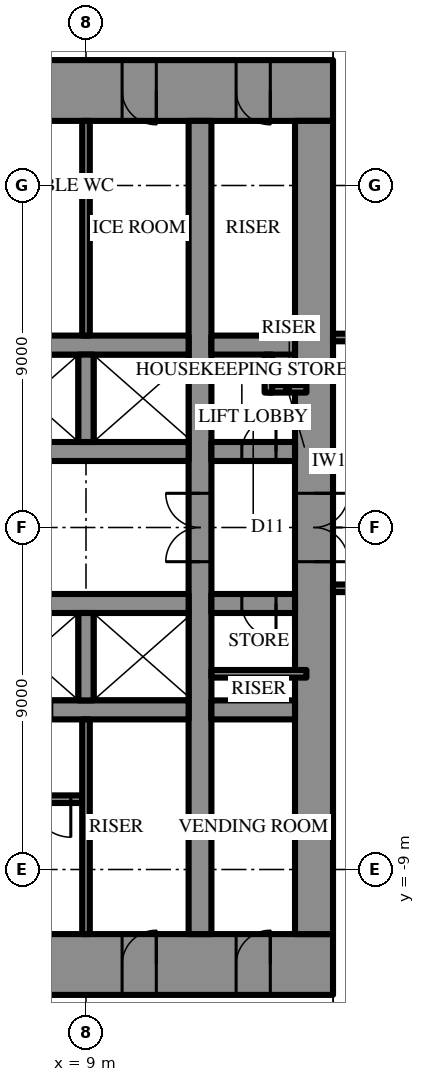
"""IFC4 building model, lengths in metres.
Left out: names, types, materials, properties, quantities, classifications, styles, units other than length and angle.
Written with IfcOpenShell. Run it as: python <this file> out.ifc"""

import sys

from ifc_helpers import new_model, si_unit, direction, frame, frame_2d, origin, place, context, subcontext, project, spatial, rectangle, extrude, element, fill, save


model = new_model("IFC4")
c1 = context("Model", 3, precision=1e-05, world=origin(), true_north=direction((0.0, 1.0)))
c2 = subcontext(c1, "Body", "Model", "MODEL_VIEW")
j1 = project(units=[si_unit("LENGTHUNIT", "METRE"), si_unit("PLANEANGLEUNIT", "RADIAN")], contexts=[c1])
p1 = place(None, origin())
s1 = spatial("IfcSite", under=j1, at=p1, CompositionType="ELEMENT")
p2 = place(p1, origin())
s2 = spatial("IfcBuilding", under=s1, at=p2, CompositionType="ELEMENT")
p3 = place(p2, frame((0.0, 0.0, 274.3)))
s3 = spatial("IfcBuildingStorey", under=s2, at=p3, CompositionType="ELEMENT", Elevation=274.3)
p4 = place(p3, frame((-15.5, 11.5, 0.0), z_axis=(0.0, 0.0, 1.0), x_axis=(1.0, 0.0, 0.0)))
e1 = element("IfcWall", 1, at=p4, inside=s3, PredefinedType="SHEAR", context=c2, shape_type="SweptSolid", body=[
    extrude(rectangle(XDim=31.0, YDim=1.6, at=frame_2d((15.5, 0.0))), origin(), (0.0, 0.0, 1.0), 4.2),
])
p5 = place(p4, frame((16.35, 0.0, 0.0)))
e2 = element("IfcOpeningElement", 2, at=p5, cuts=e1, PredefinedType="OPENING", context=c2, shape_type="SweptSolid", body=[
    extrude(rectangle(XDim=0.9, YDim=2.2, at=frame_2d((0.45, 1.1))), frame((0.0, 0.81, 0.0), z_axis=(0.0, -1.0, 0.0), x_axis=(1.0, 0.0, 0.0)), (0.0, 0.0, 1.0), 1.62),
])
p6 = place(p4, frame((19.35, 0.0, 0.0)))
e3 = element("IfcOpeningElement", 3, at=p6, cuts=e1, PredefinedType="OPENING", context=c2, shape_type="SweptSolid", body=[
    extrude(rectangle(XDim=0.9, YDim=2.2, at=frame_2d((0.45, 1.1))), frame((0.0, 0.81, 0.0), z_axis=(0.0, -1.0, 0.0), x_axis=(1.0, 0.0, 0.0)), (0.0, 0.0, 1.0), 1.62),
])
p7 = place(p4, frame((22.4, 0.0, 0.0)))
e4 = element("IfcOpeningElement", 4, at=p7, cuts=e1, PredefinedType="OPENING", context=c2, shape_type="SweptSolid", body=[
    extrude(rectangle(XDim=1.0, YDim=2.2, at=frame_2d((0.5, 1.1))), frame((0.0, 0.81, 0.0), z_axis=(0.0, -1.0, 0.0), x_axis=(1.0, 0.0, 0.0)), (0.0, 0.0, 1.0), 1.62),
])
p8 = place(p4, frame((1.65, 0.0, 0.0)))
e5 = element("IfcOpeningElement", 5, at=p8, cuts=e1, PredefinedType="OPENING", context=c2, shape_type="SweptSolid", body=[
    extrude(rectangle(XDim=0.9, YDim=2.2, at=frame_2d((0.45, 1.1))), frame((0.0, 0.81, 0.0), z_axis=(0.0, -1.0, 0.0), x_axis=(1.0, 0.0, 0.0)), (0.0, 0.0, 1.0), 1.62),
])
p9 = place(p4, frame((4.65, 0.0, 0.0)))
e6 = element("IfcOpeningElement", 6, at=p9, cuts=e1, PredefinedType="OPENING", context=c2, shape_type="SweptSolid", body=[
    extrude(rectangle(XDim=0.9, YDim=2.2, at=frame_2d((0.45, 1.1))), frame((0.0, 0.81, 0.0), z_axis=(0.0, -1.0, 0.0), x_axis=(1.0, 0.0, 0.0)), (0.0, 0.0, 1.0), 1.62),
])
p10 = place(p4, frame((25.45, 0.0, 0.0)))
e7 = element("IfcOpeningElement", 7, at=p10, cuts=e1, PredefinedType="OPENING", context=c2, shape_type="SweptSolid", body=[
    extrude(rectangle(XDim=0.9, YDim=2.2, at=frame_2d((0.45, 1.1))), frame((0.0, 0.81, 0.0), z_axis=(0.0, -1.0, 0.0), x_axis=(1.0, 0.0, 0.0)), (0.0, 0.0, 1.0), 1.62),
])
p11 = place(p4, frame((28.45, 0.0, 0.0)))
e8 = element("IfcOpeningElement", 8, at=p11, cuts=e1, PredefinedType="OPENING", context=c2, shape_type="SweptSolid", body=[
    extrude(rectangle(XDim=0.9, YDim=2.2, at=frame_2d((0.45, 1.1))), frame((0.0, 0.81, 0.0), z_axis=(0.0, -1.0, 0.0), x_axis=(1.0, 0.0, 0.0)), (0.0, 0.0, 1.0), 1.62),
])
p12 = place(p3, frame((15.5, -11.5, 0.0), z_axis=(0.0, 0.0, 1.0), x_axis=(-1.0, 0.0, 0.0)))
e9 = element("IfcWall", 9, at=p12, inside=s3, PredefinedType="SHEAR", context=c2, shape_type="SweptSolid", body=[
    extrude(rectangle(XDim=31.0, YDim=1.6, at=frame_2d((15.5, 0.0))), origin(), (0.0, 0.0, 1.0), 4.2),
])
p13 = place(p12, frame((16.35, 0.0, 0.0)))
e10 = element("IfcOpeningElement", 10, at=p13, cuts=e9, PredefinedType="OPENING", context=c2, shape_type="SweptSolid", body=[
    extrude(rectangle(XDim=0.9, YDim=2.2, at=frame_2d((0.45, 1.1))), frame((0.0, 0.81, 0.0), z_axis=(0.0, -1.0, 0.0), x_axis=(1.0, 0.0, 0.0)), (0.0, 0.0, 1.0), 1.62),
])
p14 = place(p12, frame((19.35, 0.0, 0.0)))
e11 = element("IfcOpeningElement", 11, at=p14, cuts=e9, PredefinedType="OPENING", context=c2, shape_type="SweptSolid", body=[
    extrude(rectangle(XDim=0.9, YDim=2.2, at=frame_2d((0.45, 1.1))), frame((0.0, 0.81, 0.0), z_axis=(0.0, -1.0, 0.0), x_axis=(1.0, 0.0, 0.0)), (0.0, 0.0, 1.0), 1.62),
])
p15 = place(p12, frame((22.4, 0.0, 0.0)))
e12 = element("IfcOpeningElement", 12, at=p15, cuts=e9, PredefinedType="OPENING", context=c2, shape_type="SweptSolid", body=[
    extrude(rectangle(XDim=1.0, YDim=2.2, at=frame_2d((0.5, 1.1))), frame((0.0, 0.81, 0.0), z_axis=(0.0, -1.0, 0.0), x_axis=(1.0, 0.0, 0.0)), (0.0, 0.0, 1.0), 1.62),
])
p16 = place(p12, frame((1.65, 0.0, 0.0)))
e13 = element("IfcOpeningElement", 13, at=p16, cuts=e9, PredefinedType="OPENING", context=c2, shape_type="SweptSolid", body=[
    extrude(rectangle(XDim=0.9, YDim=2.2, at=frame_2d((0.45, 1.1))), frame((0.0, 0.81, 0.0), z_axis=(0.0, -1.0, 0.0), x_axis=(1.0, 0.0, 0.0)), (0.0, 0.0, 1.0), 1.62),
])
p17 = place(p12, frame((4.65, 0.0, 0.0)))
e14 = element("IfcOpeningElement", 14, at=p17, cuts=e9, PredefinedType="OPENING", context=c2, shape_type="SweptSolid", body=[
    extrude(rectangle(XDim=0.9, YDim=2.2, at=frame_2d((0.45, 1.1))), frame((0.0, 0.81, 0.0), z_axis=(0.0, -1.0, 0.0), x_axis=(1.0, 0.0, 0.0)), (0.0, 0.0, 1.0), 1.62),
])
p18 = place(p12, frame((25.45, 0.0, 0.0)))
e15 = element("IfcOpeningElement", 15, at=p18, cuts=e9, PredefinedType="OPENING", context=c2, shape_type="SweptSolid", body=[
    extrude(rectangle(XDim=0.9, YDim=2.2, at=frame_2d((0.45, 1.1))), frame((0.0, 0.81, 0.0), z_axis=(0.0, -1.0, 0.0), x_axis=(1.0, 0.0, 0.0)), (0.0, 0.0, 1.0), 1.62),
])
p19 = place(p12, frame((28.45, 0.0, 0.0)))
e16 = element("IfcOpeningElement", 16, at=p19, cuts=e9, PredefinedType="OPENING", context=c2, shape_type="SweptSolid", body=[
    extrude(rectangle(XDim=0.9, YDim=2.2, at=frame_2d((0.45, 1.1))), frame((0.0, 0.81, 0.0), z_axis=(0.0, -1.0, 0.0), x_axis=(1.0, 0.0, 0.0)), (0.0, 0.0, 1.0), 1.62),
])
p20 = place(p3, frame((15.0, -10.7, 0.0), z_axis=(0.0, 0.0, 1.0), x_axis=(0.0, 1.0, 0.0)))
e17 = element("IfcWall", 17, at=p20, inside=s3, PredefinedType="SHEAR", context=c2, shape_type="SweptSolid", body=[
    extrude(rectangle(XDim=21.4, YDim=1.0, at=frame_2d((10.7, 0.0))), origin(), (0.0, 0.0, 1.0), 4.2),
])
p21 = place(p20, frame((9.8, 0.0, 0.0)))
e18 = element("IfcOpeningElement", 18, at=p21, cuts=e17, PredefinedType="OPENING", context=c2, shape_type="SweptSolid", body=[
    extrude(rectangle(XDim=1.8, YDim=2.4, at=frame_2d((0.9, 1.2))), frame((0.0, 0.51, 0.0), z_axis=(0.0, -1.0, 0.0), x_axis=(1.0, 0.0, 0.0)), (0.0, 0.0, 1.0), 1.02),
])
p22 = place(p3, frame((12.0, -10.7, 0.0), z_axis=(0.0, 0.0, 1.0), x_axis=(0.0, 1.0, 0.0)))
e19 = element("IfcWall", 19, at=p22, inside=s3, PredefinedType="SHEAR", context=c2, shape_type="SweptSolid", body=[
    extrude(rectangle(XDim=21.4, YDim=0.6, at=frame_2d((10.7, 0.0))), origin(), (0.0, 0.0, 1.0), 4.2),
])
p23 = place(p22, frame((9.8, 0.0, 0.0)))
e20 = element("IfcOpeningElement", 20, at=p23, cuts=e19, PredefinedType="OPENING", context=c2, shape_type="SweptSolid", body=[
    extrude(rectangle(XDim=1.8, YDim=2.4, at=frame_2d((0.9, 1.2))), frame((0.0, 0.31, 0.0), z_axis=(0.0, -1.0, 0.0), x_axis=(1.0, 0.0, 0.0)), (0.0, 0.0, 1.0), 0.62),
])
p24 = place(p3, frame((-3.2, 2.0, 0.0), z_axis=(0.0, 0.0, 1.0), x_axis=(1.0, 0.0, 0.0)))
e21 = element("IfcWall", 21, at=p24, inside=s3, PredefinedType="SHEAR", context=c2, shape_type="SweptSolid", body=[
    extrude(rectangle(XDim=14.9, YDim=0.5, at=frame_2d((7.45, 0.0))), origin(), (0.0, 0.0, 1.0), 4.2),
])
p25 = place(p24, frame((1.15, 0.0, 0.0)))
e22 = element("IfcOpeningElement", 22, at=p25, cuts=e21, PredefinedType="OPENING", context=c2, shape_type="SweptSolid", body=[
    extrude(rectangle(XDim=1.1, YDim=2.2, at=frame_2d((0.55, 1.1))), frame((0.0, 0.26, 0.0), z_axis=(0.0, -1.0, 0.0), x_axis=(1.0, 0.0, 0.0)), (0.0, 0.0, 1.0), 0.52),
])
p26 = place(p24, frame((4.15, 0.0, 0.0)))
e23 = element("IfcOpeningElement", 23, at=p26, cuts=e21, PredefinedType="OPENING", context=c2, shape_type="SweptSolid", body=[
    extrude(rectangle(XDim=1.1, YDim=2.2, at=frame_2d((0.55, 1.1))), frame((0.0, 0.26, 0.0), z_axis=(0.0, -1.0, 0.0), x_axis=(1.0, 0.0, 0.0)), (0.0, 0.0, 1.0), 0.52),
])
p27 = place(p24, frame((7.15, 0.0, 0.0)))
e24 = element("IfcOpeningElement", 24, at=p27, cuts=e21, PredefinedType="OPENING", context=c2, shape_type="SweptSolid", body=[
    extrude(rectangle(XDim=1.1, YDim=2.2, at=frame_2d((0.55, 1.1))), frame((0.0, 0.26, 0.0), z_axis=(0.0, -1.0, 0.0), x_axis=(1.0, 0.0, 0.0)), (0.0, 0.0, 1.0), 0.52),
])
p28 = place(p24, frame((10.15, 0.0, 0.0)))
e25 = element("IfcOpeningElement", 25, at=p28, cuts=e21, PredefinedType="OPENING", context=c2, shape_type="SweptSolid", body=[
    extrude(rectangle(XDim=1.1, YDim=2.2, at=frame_2d((0.55, 1.1))), frame((0.0, 0.26, 0.0), z_axis=(0.0, -1.0, 0.0), x_axis=(1.0, 0.0, 0.0)), (0.0, 0.0, 1.0), 0.52),
])
p29 = place(p3, frame((12.3, 2.0, 0.0), z_axis=(0.0, 0.0, 1.0), x_axis=(1.0, 0.0, 0.0)))
e26 = element("IfcWall", 26, at=p29, inside=s3, PredefinedType="SHEAR", context=c2, shape_type="SweptSolid", body=[
    extrude(rectangle(XDim=2.2, YDim=0.5, at=frame_2d((1.1, 0.0))), origin(), (0.0, 0.0, 1.0), 4.2),
])
p30 = place(p29, frame((0.8, 0.0, 0.0)))
e27 = element("IfcOpeningElement", 27, at=p30, cuts=e26, PredefinedType="OPENING", context=c2, shape_type="SweptSolid", body=[
    extrude(rectangle(XDim=0.9, YDim=2.2, at=frame_2d((0.45, 1.1))), frame((0.0, 0.26, 0.0), z_axis=(0.0, -1.0, 0.0), x_axis=(1.0, 0.0, 0.0)), (0.0, 0.0, 1.0), 0.52),
])
p31 = place(p3, frame((-11.7, 4.8, 0.0), z_axis=(0.0, 0.0, 1.0), x_axis=(1.0, 0.0, 0.0)))
e28 = element("IfcWall", 28, at=p31, inside=s3, PredefinedType="SHEAR", context=c2, shape_type="SweptSolid", body=[
    extrude(rectangle(XDim=23.4, YDim=0.5, at=frame_2d((11.7, 0.0))), origin(), (0.0, 0.0, 1.0), 4.2),
])
p32 = place(p31, frame((6.6, 0.0, 0.0)))
e29 = element("IfcOpeningElement", 29, at=p32, cuts=e28, PredefinedType="OPENING", context=c2, shape_type="SweptSolid", body=[
    extrude(rectangle(XDim=1.2, YDim=2.2, at=frame_2d((0.6, 1.1))), frame((0.0, 0.26, 0.0), z_axis=(0.0, -1.0, 0.0), x_axis=(1.0, 0.0, 0.0)), (0.0, 0.0, 1.0), 0.52),
])
p33 = place(p31, frame((3.6, 0.0, 0.0)))
e30 = element("IfcOpeningElement", 30, at=p33, cuts=e28, PredefinedType="OPENING", context=c2, shape_type="SweptSolid", body=[
    extrude(rectangle(XDim=1.2, YDim=2.2, at=frame_2d((0.6, 1.1))), frame((0.0, 0.26, 0.0), z_axis=(0.0, -1.0, 0.0), x_axis=(1.0, 0.0, 0.0)), (0.0, 0.0, 1.0), 0.52),
])
p34 = place(p3, frame((12.3, 4.8, 0.0), z_axis=(0.0, 0.0, 1.0), x_axis=(1.0, 0.0, 0.0)))
e31 = element("IfcWall", 31, at=p34, inside=s3, PredefinedType="SHEAR", context=c2, shape_type="SweptSolid", body=[
    extrude(rectangle(XDim=2.2, YDim=0.5, at=frame_2d((1.1, 0.0))), origin(), (0.0, 0.0, 1.0), 4.2),
])
p35 = place(p3, frame((9.0, 2.25, 0.0), z_axis=(0.0, 0.0, 1.0), x_axis=(0.0, 1.0, 0.0)))
e32 = element("IfcWall", 32, at=p35, inside=s3, PredefinedType="SHEAR", context=c2, shape_type="SweptSolid", body=[
    extrude(rectangle(XDim=2.3, YDim=0.4, at=frame_2d((1.15, 0.0))), origin(), (0.0, 0.0, 1.0), 4.2),
])
p36 = place(p3, frame((14.5, -2.0, 0.0), z_axis=(0.0, 0.0, 1.0), x_axis=(-1.0, 0.0, 0.0)))
e33 = element("IfcWall", 33, at=p36, inside=s3, PredefinedType="SHEAR", context=c2, shape_type="SweptSolid", body=[
    extrude(rectangle(XDim=2.2, YDim=0.5, at=frame_2d((1.1, 0.0))), origin(), (0.0, 0.0, 1.0), 4.2),
])
p37 = place(p36, frame((0.5, 0.0, 0.0)))
e34 = element("IfcOpeningElement", 34, at=p37, cuts=e33, PredefinedType="OPENING", context=c2, shape_type="SweptSolid", body=[
    extrude(rectangle(XDim=0.9, YDim=2.2, at=frame_2d((0.45, 1.1))), frame((0.0, 0.26, 0.0), z_axis=(0.0, -1.0, 0.0), x_axis=(1.0, 0.0, 0.0)), (0.0, 0.0, 1.0), 0.52),
])
p38 = place(p3, frame((11.7, -2.0, 0.0), z_axis=(0.0, 0.0, 1.0), x_axis=(-1.0, 0.0, 0.0)))
e35 = element("IfcWall", 35, at=p38, inside=s3, PredefinedType="SHEAR", context=c2, shape_type="SweptSolid", body=[
    extrude(rectangle(XDim=5.9, YDim=0.5, at=frame_2d((2.95, 0.0))), origin(), (0.0, 0.0, 1.0), 4.2),
])
p39 = place(p3, frame((14.5, -4.8, 0.0), z_axis=(0.0, 0.0, 1.0), x_axis=(-1.0, 0.0, 0.0)))
e36 = element("IfcWall", 36, at=p39, inside=s3, PredefinedType="SHEAR", context=c2, shape_type="SweptSolid", body=[
    extrude(rectangle(XDim=2.2, YDim=0.5, at=frame_2d((1.1, 0.0))), origin(), (0.0, 0.0, 1.0), 4.2),
])
p40 = place(p3, frame((11.7, -4.8, 0.0), z_axis=(0.0, 0.0, 1.0), x_axis=(-1.0, 0.0, 0.0)))
e37 = element("IfcWall", 37, at=p40, inside=s3, PredefinedType="SHEAR", context=c2, shape_type="SweptSolid", body=[
    extrude(rectangle(XDim=23.4, YDim=0.5, at=frame_2d((11.7, 0.0))), origin(), (0.0, 0.0, 1.0), 4.2),
])
p41 = place(p40, frame((6.6, 0.0, 0.0)))
e38 = element("IfcOpeningElement", 38, at=p41, cuts=e37, PredefinedType="OPENING", context=c2, shape_type="SweptSolid", body=[
    extrude(rectangle(XDim=1.2, YDim=2.2, at=frame_2d((0.6, 1.1))), frame((0.0, 0.26, 0.0), z_axis=(0.0, -1.0, 0.0), x_axis=(1.0, 0.0, 0.0)), (0.0, 0.0, 1.0), 0.52),
])
p42 = place(p40, frame((3.6, 0.0, 0.0)))
e39 = element("IfcOpeningElement", 39, at=p42, cuts=e37, PredefinedType="OPENING", context=c2, shape_type="SweptSolid", body=[
    extrude(rectangle(XDim=1.2, YDim=2.2, at=frame_2d((0.6, 1.1))), frame((0.0, 0.26, 0.0), z_axis=(0.0, -1.0, 0.0), x_axis=(1.0, 0.0, 0.0)), (0.0, 0.0, 1.0), 0.52),
])
p43 = place(p3, frame((9.0, -2.25, 0.0), z_axis=(0.0, 0.0, 1.0), x_axis=(0.0, -1.0, 0.0)))
e40 = element("IfcWall", 40, at=p43, inside=s3, PredefinedType="SHEAR", context=c2, shape_type="SweptSolid", body=[
    extrude(rectangle(XDim=2.3, YDim=0.4, at=frame_2d((1.15, 0.0))), origin(), (0.0, 0.0, 1.0), 4.2),
])
p44 = place(p3, frame((8.9, -7.15, 0.0), z_axis=(0.0, 0.0, 1.0), x_axis=(-1.0, 0.0, 0.0)))
e41 = element("IfcWall", 41, at=p44, inside=s3, PredefinedType="SHEAR", context=c2, shape_type="SweptSolid", body=[
    extrude(rectangle(XDim=8.6, YDim=0.2, at=frame_2d((4.3, 0.0))), origin(), (0.0, 0.0, 1.0), 4.2),
])
p45 = place(p44, frame((0.3, 0.0, 0.0)))
e42 = element("IfcOpeningElement", 42, at=p45, cuts=e41, PredefinedType="OPENING", context=c2, shape_type="SweptSolid", body=[
    extrude(rectangle(XDim=1.0, YDim=2.2, at=frame_2d((0.5, 1.1))), frame((0.0, 0.11, 0.0), z_axis=(0.0, -1.0, 0.0), x_axis=(1.0, 0.0, 0.0)), (0.0, 0.0, 1.0), 0.22),
])
for number, where, z_axis, x_axis in (
    (43, (9.0, 5.05, 0.0), (0.0, 0.0, 1.0), (0.0, 1.0, 0.0)),
    (44, (9.0, -5.05, 0.0), (0.0, 0.0, 1.0), (0.0, -1.0, 0.0)),
):
    element("IfcWall", number, at=place(p3, frame(where, z_axis=z_axis, x_axis=x_axis)), inside=s3, PredefinedType="PARTITIONING", context=c2, shape_type="SweptSolid", body=[
        extrude(rectangle(XDim=5.65, YDim=0.2, at=frame_2d((2.825, 0.0))), origin(), (0.0, 0.0, 1.0), 4.0),
    ])
for number, where, z_axis, x_axis in (
    (45, (13.8, 3.65, 0.0), (0.0, 0.0, 1.0), (1.0, 0.0, 0.0)),
    (46, (13.8, 3.55, 0.0), (0.0, 0.0, 1.0), (0.0, 1.0, 0.0)),
):
    element("IfcWall", number, at=place(p3, frame(where, z_axis=z_axis, x_axis=x_axis)), inside=s3, PredefinedType="PARTITIONING", context=c2, shape_type="SweptSolid", body=[
        extrude(rectangle(XDim=1.0, YDim=0.2, at=frame_2d((0.5, 0.0))), origin(), (0.0, 0.0, 1.0), 4.0),
    ])
p46 = place(p3, frame((14.8, -3.85, 0.0), z_axis=(0.0, 0.0, 1.0), x_axis=(-1.0, 0.0, 0.0)))
e47 = element("IfcWall", 47, at=p46, inside=s3, PredefinedType="PARTITIONING", context=c2, shape_type="SweptSolid", body=[
    extrude(rectangle(XDim=2.5, YDim=0.2, at=frame_2d((1.25, 0.0))), origin(), (0.0, 0.0, 1.0), 4.0),
])
p47 = place(p3, frame((15.5, 1.6, 0.0), z_axis=(0.0, 0.0, 1.0), x_axis=(1.0, 0.0, 0.0)))
e48 = element("IfcWall", 48, at=p47, inside=s3, PredefinedType="PARTITIONING", context=c2, shape_type="SweptSolid", body=[
    extrude(rectangle(XDim=10.7, YDim=0.2, at=frame_2d((5.35, 0.0))), origin(), (0.0, 0.0, 1.0), 4.0),
])
p48 = place(p47, frame((2.71, 0.0, 0.0)))
e49 = element("IfcOpeningElement", 49, at=p48, cuts=e48, PredefinedType="OPENING", context=c2, shape_type="SweptSolid", body=[
    extrude(rectangle(XDim=1.0, YDim=2.2, at=frame_2d((0.5, 1.1))), frame((0.0, 0.11, 0.0), z_axis=(0.0, -1.0, 0.0), x_axis=(1.0, 0.0, 0.0)), (0.0, 0.0, 1.0), 0.22),
])
p49 = place(p3, frame((15.5, -1.6, 0.0), z_axis=(0.0, 0.0, 1.0), x_axis=(1.0, 0.0, 0.0)))
e50 = element("IfcWall", 50, at=p49, inside=s3, PredefinedType="PARTITIONING", context=c2, shape_type="SweptSolid", body=[
    extrude(rectangle(XDim=2.3, YDim=0.2, at=frame_2d((1.15, 0.0))), origin(), (0.0, 0.0, 1.0), 4.0),
])
p50 = place(p3, frame((15.5, 5.0, 0.0), z_axis=(0.0, 0.0, 1.0), x_axis=(1.0, 0.0, 0.0)))
e51 = element("IfcWall", 51, at=p50, inside=s3, PredefinedType="PARTITIONING", context=c2, shape_type="SweptSolid", body=[
    extrude(rectangle(XDim=14.845, YDim=0.2, at=frame_2d((7.423, 0.0))), origin(), (0.0, 0.0, 1.0), 4.0),
])
p51 = place(p50, frame((0.985, 0.0, 0.0)))
e52 = element("IfcOpeningElement", 52, at=p51, cuts=e51, PredefinedType="OPENING", context=c2, shape_type="SweptSolid", body=[
    extrude(rectangle(XDim=1.0, YDim=2.2, at=frame_2d((0.5, 1.1))), frame((0.0, 0.11, 0.0), z_axis=(0.0, -1.0, 0.0), x_axis=(1.0, 0.0, 0.0)), (0.0, 0.0, 1.0), 0.22),
])
p52 = place(p21, frame((1.8, 0.0, 0.0), z_axis=(0.0, 0.0, 1.0), x_axis=(-1.0, 0.0, 0.0)))
e53 = element("IfcDoor", 53, at=p52, inside=s3, OperationType="DOUBLE_DOOR_SINGLE_SWING", PredefinedType="DOOR", context=c2, shape_type="SweptSolid", body=[
    extrude(rectangle(XDim=1.8, YDim=2.4, at=frame_2d((0.9, 1.2))), frame((0.0, 0.025, 0.0), z_axis=(0.0, -1.0, 0.0), x_axis=(1.0, 0.0, 0.0)), (0.0, 0.0, 1.0), 0.05),
])
fill(e18, e53)
p53 = place(p10, frame((0.9, 0.0, 0.0), z_axis=(0.0, 0.0, 1.0), x_axis=(-1.0, 0.0, 0.0)))
e54 = element("IfcDoor", 54, at=p53, inside=s3, OperationType="SINGLE_SWING_RIGHT", PredefinedType="DOOR", context=c2, shape_type="SweptSolid", body=[
    extrude(rectangle(XDim=0.9, YDim=2.2, at=frame_2d((0.45, 1.1))), frame((0.0, 0.025, 0.0), z_axis=(0.0, -1.0, 0.0), x_axis=(1.0, 0.0, 0.0)), (0.0, 0.0, 1.0), 0.05),
])
fill(e7, e54)
p54 = place(p11, frame((0.9, 0.0, 0.0), z_axis=(0.0, 0.0, 1.0), x_axis=(-1.0, 0.0, 0.0)))
e55 = element("IfcDoor", 55, at=p54, inside=s3, OperationType="SINGLE_SWING_RIGHT", PredefinedType="DOOR", context=c2, shape_type="SweptSolid", body=[
    extrude(rectangle(XDim=0.9, YDim=2.2, at=frame_2d((0.45, 1.1))), frame((0.0, 0.025, 0.0), z_axis=(0.0, -1.0, 0.0), x_axis=(1.0, 0.0, 0.0)), (0.0, 0.0, 1.0), 0.05),
])
fill(e8, e55)
p55 = place(p45, origin())
e56 = element("IfcDoor", 56, at=p55, inside=s3, OperationType="SINGLE_SWING_RIGHT", PredefinedType="DOOR", context=c2, shape_type="SweptSolid", body=[
    extrude(rectangle(XDim=1.0, YDim=2.2, at=frame_2d((0.5, 1.1))), frame((0.0, 0.025, 0.0), z_axis=(0.0, -1.0, 0.0), x_axis=(1.0, 0.0, 0.0)), (0.0, 0.0, 1.0), 0.05),
])
fill(e42, e56)
p56 = place(p16, frame((0.9, 0.0, 0.0), z_axis=(0.0, 0.0, 1.0), x_axis=(-1.0, 0.0, 0.0)))
e57 = element("IfcDoor", 57, at=p56, inside=s3, OperationType="SINGLE_SWING_LEFT", PredefinedType="DOOR", context=c2, shape_type="SweptSolid", body=[
    extrude(rectangle(XDim=0.9, YDim=2.2, at=frame_2d((0.45, 1.1))), frame((0.0, 0.025, 0.0), z_axis=(0.0, -1.0, 0.0), x_axis=(1.0, 0.0, 0.0)), (0.0, 0.0, 1.0), 0.05),
])
fill(e13, e57)
p57 = place(p17, frame((0.9, 0.0, 0.0), z_axis=(0.0, 0.0, 1.0), x_axis=(-1.0, 0.0, 0.0)))
e58 = element("IfcDoor", 58, at=p57, inside=s3, OperationType="SINGLE_SWING_LEFT", PredefinedType="DOOR", context=c2, shape_type="SweptSolid", body=[
    extrude(rectangle(XDim=0.9, YDim=2.2, at=frame_2d((0.45, 1.1))), frame((0.0, 0.025, 0.0), z_axis=(0.0, -1.0, 0.0), x_axis=(1.0, 0.0, 0.0)), (0.0, 0.0, 1.0), 0.05),
])
fill(e14, e58)
p58 = place(p30, origin())
e59 = element("IfcDoor", 59, at=p58, inside=s3, OperationType="SINGLE_SWING_LEFT", PredefinedType="DOOR", context=c2, shape_type="SweptSolid", body=[
    extrude(rectangle(XDim=0.9, YDim=2.2, at=frame_2d((0.45, 1.1))), frame((0.0, 0.025, 0.0), z_axis=(0.0, -1.0, 0.0), x_axis=(1.0, 0.0, 0.0)), (0.0, 0.0, 1.0), 0.05),
])
fill(e27, e59)
p59 = place(p37, origin())
e60 = element("IfcDoor", 60, at=p59, inside=s3, OperationType="SINGLE_SWING_RIGHT", PredefinedType="DOOR", context=c2, shape_type="SweptSolid", body=[
    extrude(rectangle(XDim=0.9, YDim=2.2, at=frame_2d((0.45, 1.1))), frame((0.0, 0.025, 0.0), z_axis=(0.0, -1.0, 0.0), x_axis=(1.0, 0.0, 0.0)), (0.0, 0.0, 1.0), 0.05),
])
fill(e34, e60)
p60 = place(p23, origin())
e61 = element("IfcDoor", 61, at=p60, inside=s3, OperationType="DOUBLE_DOOR_SINGLE_SWING", PredefinedType="DOOR", context=c2, shape_type="SweptSolid", body=[
    extrude(rectangle(XDim=1.8, YDim=2.4, at=frame_2d((0.9, 1.2))), frame((0.0, 0.025, 0.0), z_axis=(0.0, -1.0, 0.0), x_axis=(1.0, 0.0, 0.0)), (0.0, 0.0, 1.0), 0.05),
])
fill(e20, e61)
save(model, sys.argv[1])
